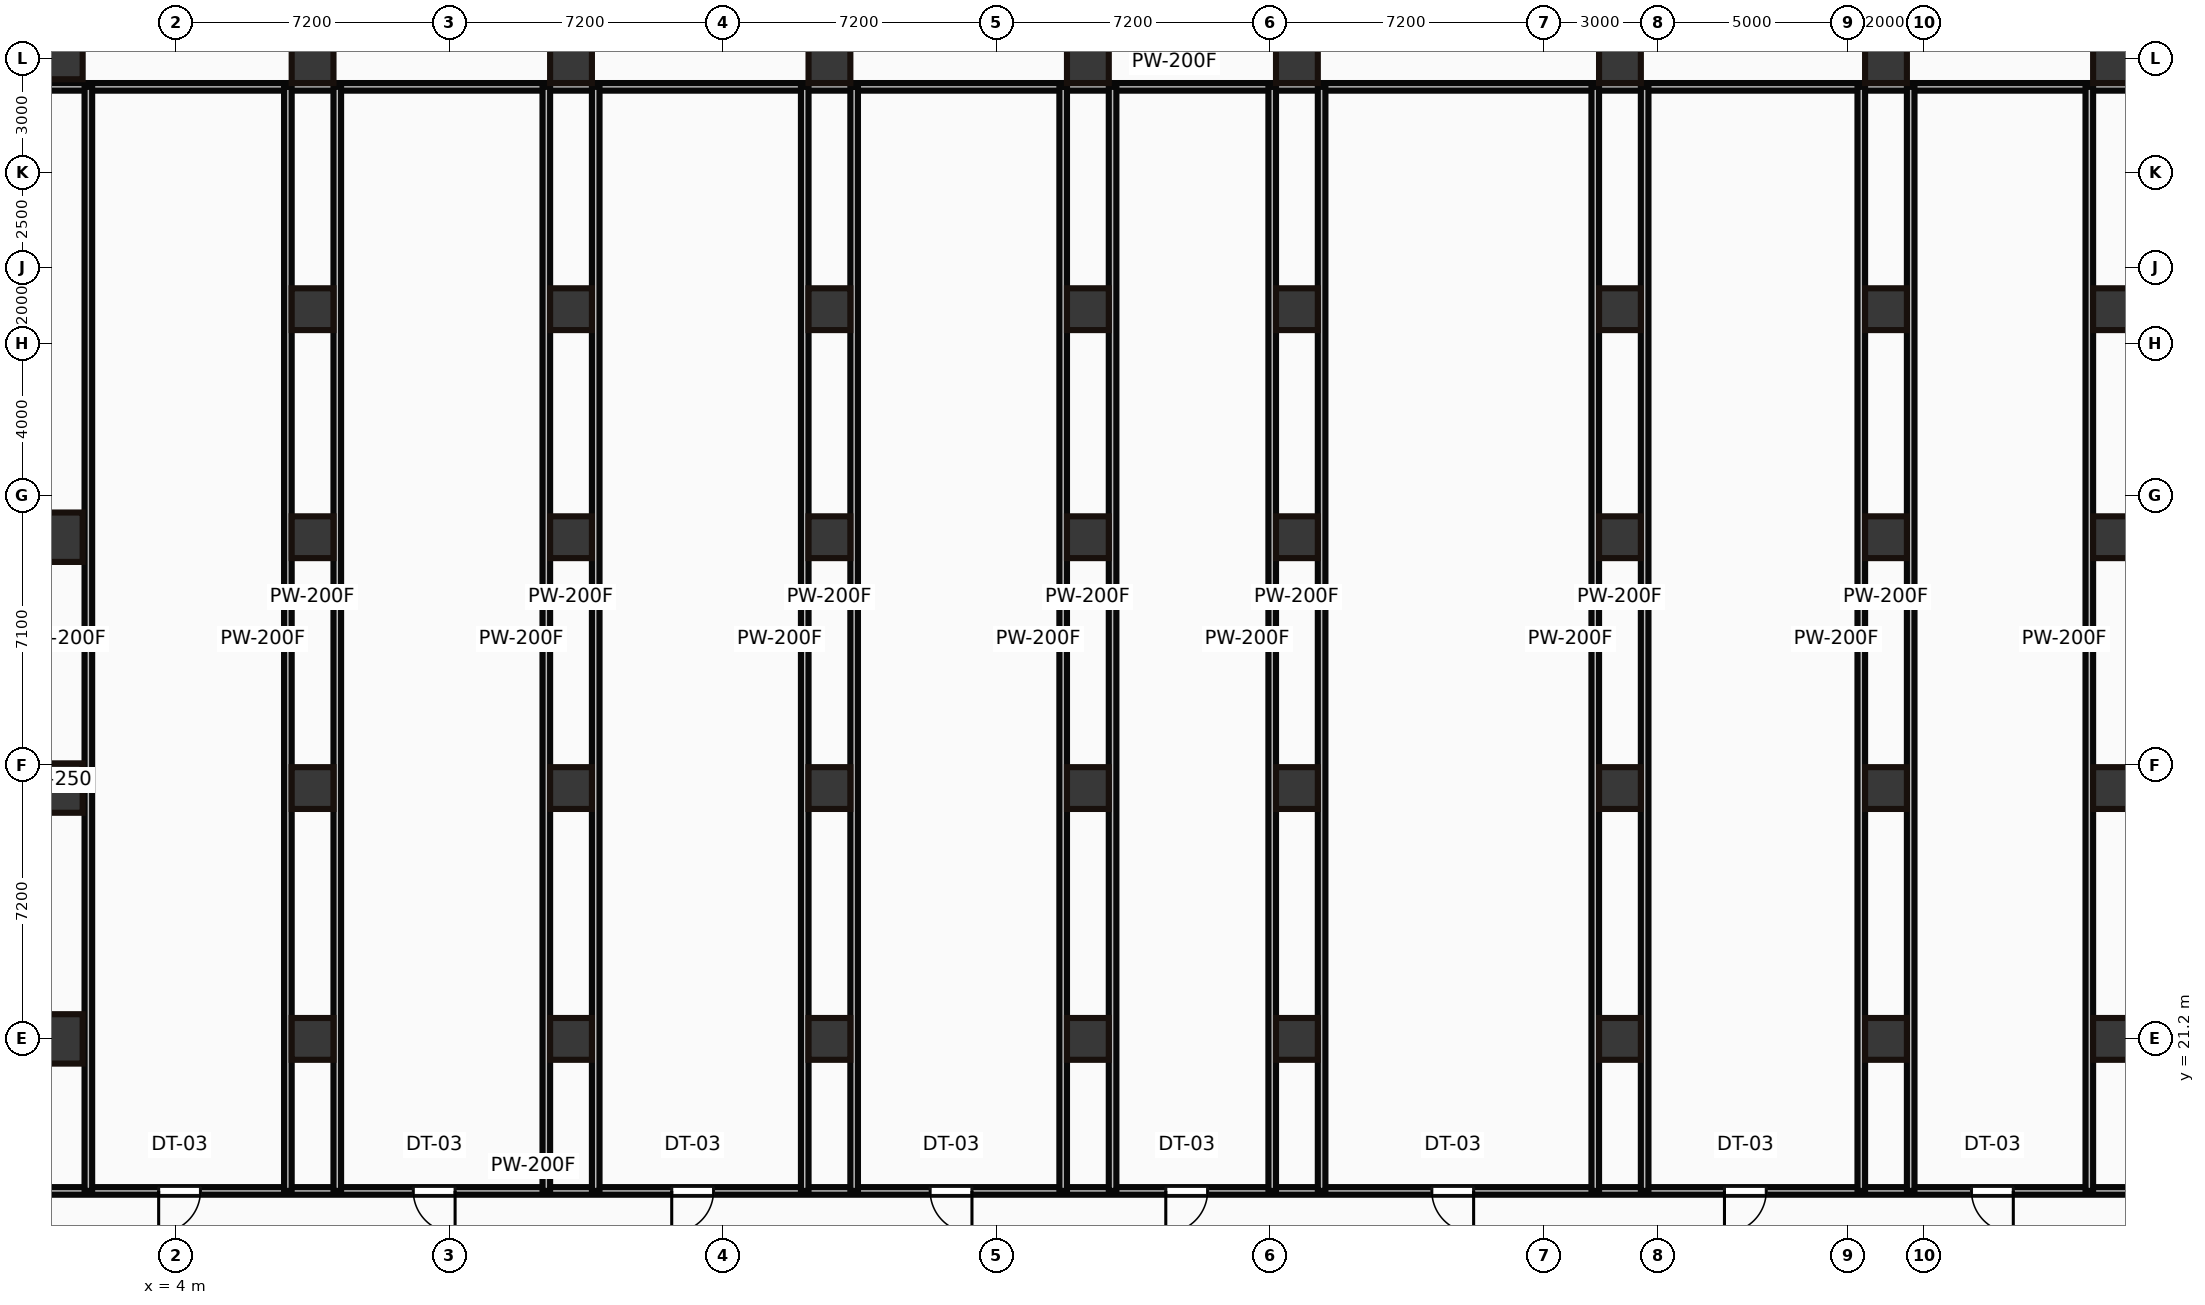
"""IFC4 building model, lengths in metres.
Left out: names, types, materials, properties, quantities, classifications, styles, units other than length and angle.
Written with IfcOpenShell. Run it as: python <this file> out.ifc"""

import sys

from ifc_helpers import new_model, si_unit, direction, frame, frame_2d, origin, origin_2d, place, context, subcontext, project, spatial, rectangle, hollow_rectangle, extrude, source, transform, mapped, element, fill, save


model = new_model("IFC4")
c1 = context("Model", 3, precision=1e-05, world=origin(), true_north=direction((0.0, 1.0)))
c2 = subcontext(c1, "Body", "Model", "MODEL_VIEW")
j1 = project(units=[si_unit("LENGTHUNIT", "METRE"), si_unit("PLANEANGLEUNIT", "RADIAN")], contexts=[c1])
p1 = place(None, origin())
s1 = spatial("IfcSite", under=j1, at=p1, CompositionType="ELEMENT")
p2 = place(p1, origin())
s2 = spatial("IfcBuilding", under=s1, at=p2, CompositionType="ELEMENT")
p3 = place(p2, frame((0.0, 0.0, 26.0)))
s3 = spatial("IfcBuildingStorey", under=s2, at=p3, CompositionType="ELEMENT", Elevation=26.0)
m1 = source(origin(), c2, "Body", "SweptSolid", [
    extrude(hollow_rectangle(XDim=1.1, YDim=1.3, WallThickness=0.055, at=origin_2d()), origin(), (0.0, 0.0, 1.0), 6.5),
])
for number, where, z_axis, x_axis in (
    (1, (1.0, 21.2, 0.0), (0.0, 0.0, 1.0), (1.0, 0.0, 0.0)),
    (2, (1.0, 27.8, 0.0), (0.0, 0.0, 1.0), (1.0, 0.0, 0.0)),
    (3, (1.0, 34.4, 0.0), (0.0, 0.0, 1.0), (1.0, 0.0, 0.0)),
):
    element("IfcColumn", number, at=place(p3, frame(where, z_axis=z_axis, x_axis=x_axis)), inside=s3, PredefinedType="PILASTER", context=c2, shape_type="MappedRepresentation", body=[
        mapped(m1, transform((0.0, 0.0, 0.0))),
    ])
m2 = source(origin(), c2, "Body", "SweptSolid", [
    extrude(hollow_rectangle(XDim=1.1, YDim=1.1, WallThickness=0.05, at=origin_2d()), origin(), (0.0, 0.0, 1.0), 6.5),
])
p4 = place(p3, frame((1.0, 47.0, 0.0), z_axis=(0.0, 0.0, 1.0), x_axis=(1.0, 0.0, 0.0)))
e4 = element("IfcColumn", 4, at=p4, inside=s3, PredefinedType="PILASTER", context=c2, shape_type="MappedRepresentation", body=[
    mapped(m2, transform((0.0, 0.0, 0.0))),
])
for number, where, z_axis, x_axis in (
    (5, (7.6, 47.0, 0.0), (0.0, 0.0, 1.0), (1.0, 0.0, 0.0)),
    (6, (14.4, 47.0, 0.0), (0.0, 0.0, 1.0), (1.0, 0.0, 0.0)),
    (7, (21.2, 47.0, 0.0), (0.0, 0.0, 1.0), (1.0, 0.0, 0.0)),
    (8, (28.0, 47.0, 0.0), (0.0, 0.0, 1.0), (1.0, 0.0, 0.0)),
    (9, (33.5, 47.0, 0.0), (0.0, 0.0, 1.0), (1.0, 0.0, 0.0)),
    (10, (42.0, 47.0, 0.0), (0.0, 0.0, 1.0), (1.0, 0.0, 0.0)),
    (11, (49.0, 47.0, 0.0), (0.0, 0.0, 1.0), (1.0, 0.0, 0.0)),
    (12, (55.0, 47.0, 0.0), (0.0, 0.0, 1.0), (1.0, 0.0, 0.0)),
):
    element("IfcColumn", number, at=place(p3, frame(where, z_axis=z_axis, x_axis=x_axis)), inside=s3, PredefinedType="PILASTER", context=c2, shape_type="MappedRepresentation", body=[
        mapped(m1, transform((0.0, 0.0, 0.0))),
    ])
m3 = source(origin(), c2, "Body", "SweptSolid", [
    extrude(hollow_rectangle(XDim=1.1, YDim=1.1, WallThickness=0.05, at=origin_2d()), origin(), (0.0, 0.0, 1.0), 5.65),
])
for number, where, z_axis, x_axis in (
    (13, (7.6, 21.2, 0.85), (0.0, 0.0, 1.0), (1.0, 0.0, 0.0)),
    (14, (7.6, 27.8, 0.85), (0.0, 0.0, 1.0), (1.0, 0.0, 0.0)),
    (15, (7.6, 34.4, 0.85), (0.0, 0.0, 1.0), (1.0, 0.0, 0.0)),
    (16, (7.6, 40.4, 0.85), (0.0, 0.0, 1.0), (1.0, 0.0, 0.0)),
    (17, (14.4, 21.2, 0.85), (0.0, 0.0, 1.0), (1.0, 0.0, 0.0)),
    (18, (14.4, 27.8, 0.85), (0.0, 0.0, 1.0), (1.0, 0.0, 0.0)),
    (19, (14.4, 34.4, 0.85), (0.0, 0.0, 1.0), (1.0, 0.0, 0.0)),
    (20, (14.4, 40.4, 0.85), (0.0, 0.0, 1.0), (1.0, 0.0, 0.0)),
    (21, (21.2, 21.2, 0.85), (0.0, 0.0, 1.0), (1.0, 0.0, 0.0)),
    (22, (21.2, 27.8, 0.85), (0.0, 0.0, 1.0), (1.0, 0.0, 0.0)),
    (23, (21.2, 34.4, 0.85), (0.0, 0.0, 1.0), (1.0, 0.0, 0.0)),
    (24, (21.2, 40.4, 0.85), (0.0, 0.0, 1.0), (1.0, 0.0, 0.0)),
    (25, (28.0, 21.2, 0.85), (0.0, 0.0, 1.0), (1.0, 0.0, 0.0)),
    (26, (28.0, 27.8, 0.85), (0.0, 0.0, 1.0), (1.0, 0.0, 0.0)),
    (27, (28.0, 34.4, 0.85), (0.0, 0.0, 1.0), (1.0, 0.0, 0.0)),
    (28, (28.0, 40.4, 0.85), (0.0, 0.0, 1.0), (1.0, 0.0, 0.0)),
    (29, (33.5, 21.2, 0.85), (0.0, 0.0, 1.0), (1.0, 0.0, 0.0)),
    (30, (33.5, 27.8, 0.85), (0.0, 0.0, 1.0), (1.0, 0.0, 0.0)),
    (31, (33.5, 34.4, 0.85), (0.0, 0.0, 1.0), (1.0, 0.0, 0.0)),
    (32, (33.5, 40.4, 0.85), (0.0, 0.0, 1.0), (1.0, 0.0, 0.0)),
    (33, (42.0, 21.2, 0.85), (0.0, 0.0, 1.0), (1.0, 0.0, 0.0)),
    (34, (42.0, 27.8, 0.85), (0.0, 0.0, 1.0), (1.0, 0.0, 0.0)),
    (35, (42.0, 34.4, 0.85), (0.0, 0.0, 1.0), (1.0, 0.0, 0.0)),
    (36, (42.0, 40.4, 0.85), (0.0, 0.0, 1.0), (1.0, 0.0, 0.0)),
    (37, (49.0, 21.2, 0.85), (0.0, 0.0, 1.0), (1.0, 0.0, 0.0)),
    (38, (49.0, 27.8, 0.85), (0.0, 0.0, 1.0), (1.0, 0.0, 0.0)),
    (39, (49.0, 34.4, 0.85), (0.0, 0.0, 1.0), (1.0, 0.0, 0.0)),
    (40, (49.0, 40.4, 0.85), (0.0, 0.0, 1.0), (1.0, 0.0, 0.0)),
    (41, (55.0, 21.2, 0.85), (0.0, 0.0, 1.0), (1.0, 0.0, 0.0)),
    (42, (55.0, 27.8, 0.85), (0.0, 0.0, 1.0), (1.0, 0.0, 0.0)),
    (43, (55.0, 34.4, 0.85), (0.0, 0.0, 1.0), (1.0, 0.0, 0.0)),
    (44, (55.0, 40.4, 0.85), (0.0, 0.0, 1.0), (1.0, 0.0, 0.0)),
):
    element("IfcColumn", number, at=place(p3, frame(where, z_axis=z_axis, x_axis=x_axis)), inside=s3, PredefinedType="PILASTER", context=c2, shape_type="MappedRepresentation", body=[
        mapped(m3, transform((0.0, 0.0, 0.0))),
    ])
m4 = source(origin(), c2, "Body", "SweptSolid", [
    extrude(rectangle(XDim=60.25, YDim=0.2, at=frame_2d((30.125, 0.0))), origin(), (0.0, 0.0, 1.0), 6.25),
])
p5 = place(p3, frame((0.15, 17.2, 0.0), z_axis=(0.0, 0.0, 1.0), x_axis=(1.0, 0.0, 0.0)))
e45 = element("IfcWall", 45, at=p5, inside=s3, PredefinedType="PARTITIONING", context=c2, shape_type="MappedRepresentation", body=[
    mapped(m4, transform((0.0, 0.0, 0.0))),
])
p6 = place(p5, frame((3.4, 0.0, 0.0)))
e46 = element("IfcOpeningElement", 46, at=p6, cuts=e45, PredefinedType="OPENING", context=c2, shape_type="SweptSolid", body=[
    extrude(rectangle(XDim=1.1, YDim=2.15, at=frame_2d((0.55, 1.075))), frame((0.0, 0.11, 0.0), z_axis=(0.0, -1.0, 0.0), x_axis=(1.0, 0.0, 0.0)), (0.0, 0.0, 1.0), 0.22),
])
p7 = place(p5, frame((10.1, 0.0, 0.0)))
e47 = element("IfcOpeningElement", 47, at=p7, cuts=e45, PredefinedType="OPENING", context=c2, shape_type="SweptSolid", body=[
    extrude(rectangle(XDim=1.1, YDim=2.15, at=frame_2d((0.55, 1.075))), frame((0.0, 0.11, 0.0), z_axis=(0.0, -1.0, 0.0), x_axis=(1.0, 0.0, 0.0)), (0.0, 0.0, 1.0), 0.22),
])
p8 = place(p5, frame((16.9, 0.0, 0.0)))
e48 = element("IfcOpeningElement", 48, at=p8, cuts=e45, PredefinedType="OPENING", context=c2, shape_type="SweptSolid", body=[
    extrude(rectangle(XDim=1.1, YDim=2.15, at=frame_2d((0.55, 1.075))), frame((0.0, 0.11, 0.0), z_axis=(0.0, -1.0, 0.0), x_axis=(1.0, 0.0, 0.0)), (0.0, 0.0, 1.0), 0.22),
])
p9 = place(p5, frame((23.7, 0.0, 0.0)))
e49 = element("IfcOpeningElement", 49, at=p9, cuts=e45, PredefinedType="OPENING", context=c2, shape_type="SweptSolid", body=[
    extrude(rectangle(XDim=1.1, YDim=2.15, at=frame_2d((0.55, 1.075))), frame((0.0, 0.11, 0.0), z_axis=(0.0, -1.0, 0.0), x_axis=(1.0, 0.0, 0.0)), (0.0, 0.0, 1.0), 0.22),
])
p10 = place(p5, frame((29.9, 0.0, 0.0)))
e50 = element("IfcOpeningElement", 50, at=p10, cuts=e45, PredefinedType="OPENING", context=c2, shape_type="SweptSolid", body=[
    extrude(rectangle(XDim=1.1, YDim=2.15, at=frame_2d((0.55, 1.075))), frame((0.0, 0.11, 0.0), z_axis=(0.0, -1.0, 0.0), x_axis=(1.0, 0.0, 0.0)), (0.0, 0.0, 1.0), 0.22),
])
p11 = place(p5, frame((36.9, 0.0, 0.0)))
e51 = element("IfcOpeningElement", 51, at=p11, cuts=e45, PredefinedType="OPENING", context=c2, shape_type="SweptSolid", body=[
    extrude(rectangle(XDim=1.1, YDim=2.15, at=frame_2d((0.55, 1.075))), frame((0.0, 0.11, 0.0), z_axis=(0.0, -1.0, 0.0), x_axis=(1.0, 0.0, 0.0)), (0.0, 0.0, 1.0), 0.22),
])
p12 = place(p5, frame((44.6, 0.0, 0.0)))
e52 = element("IfcOpeningElement", 52, at=p12, cuts=e45, PredefinedType="OPENING", context=c2, shape_type="SweptSolid", body=[
    extrude(rectangle(XDim=1.1, YDim=2.15, at=frame_2d((0.55, 1.075))), frame((0.0, 0.11, 0.0), z_axis=(0.0, -1.0, 0.0), x_axis=(1.0, 0.0, 0.0)), (0.0, 0.0, 1.0), 0.22),
])
p13 = place(p5, frame((51.1, 0.0, 0.0)))
e53 = element("IfcOpeningElement", 53, at=p13, cuts=e45, PredefinedType="OPENING", context=c2, shape_type="SweptSolid", body=[
    extrude(rectangle(XDim=1.1, YDim=2.15, at=frame_2d((0.55, 1.075))), frame((0.0, 0.11, 0.0), z_axis=(0.0, -1.0, 0.0), x_axis=(1.0, 0.0, 0.0)), (0.0, 0.0, 1.0), 0.22),
])
p14 = place(p3, frame((0.15, 46.25, 0.0), z_axis=(0.0, 0.0, 1.0), x_axis=(1.0, 0.0, 0.0)))
e54 = element("IfcWall", 54, at=p14, inside=s3, PredefinedType="PARTITIONING", context=c2, shape_type="MappedRepresentation", body=[
    mapped(m4, transform((0.0, 0.0, 0.0))),
])
m5 = source(origin(), c2, "Body", "SweptSolid", [
    extrude(rectangle(XDim=29.05, YDim=0.2, at=frame_2d((14.525, 0.0))), origin(), (0.0, 0.0, 1.0), 6.25),
])
for number, where, z_axis, x_axis in (
    (55, (1.7, 17.2, 0.0), (0.0, 0.0, 1.0), (0.0, 1.0, 0.0)),
    (56, (6.95, 17.2, 0.0), (0.0, 0.0, 1.0), (0.0, 1.0, 0.0)),
    (57, (8.25, 17.2, 0.0), (0.0, 0.0, 1.0), (0.0, 1.0, 0.0)),
    (58, (13.75, 17.2, 0.0), (0.0, 0.0, 1.0), (0.0, 1.0, 0.0)),
    (59, (15.05, 17.2, 0.0), (0.0, 0.0, 1.0), (0.0, 1.0, 0.0)),
    (60, (20.55, 17.2, 0.0), (0.0, 0.0, 1.0), (0.0, 1.0, 0.0)),
    (61, (21.85, 17.2, 0.0), (0.0, 0.0, 1.0), (0.0, 1.0, 0.0)),
    (62, (27.35, 17.2, 0.0), (0.0, 0.0, 1.0), (0.0, 1.0, 0.0)),
    (63, (28.65, 17.2, 0.0), (0.0, 0.0, 1.0), (0.0, 1.0, 0.0)),
    (64, (32.85, 17.2, 0.0), (0.0, 0.0, 1.0), (0.0, 1.0, 0.0)),
    (65, (34.15, 17.2, 0.0), (0.0, 0.0, 1.0), (0.0, 1.0, 0.0)),
    (66, (41.35, 17.2, 0.0), (0.0, 0.0, 1.0), (0.0, 1.0, 0.0)),
    (67, (42.65, 17.2, 0.0), (0.0, 0.0, 1.0), (0.0, 1.0, 0.0)),
    (68, (48.35, 17.2, 0.0), (0.0, 0.0, 1.0), (0.0, 1.0, 0.0)),
    (69, (49.65, 17.2, 0.0), (0.0, 0.0, 1.0), (0.0, 1.0, 0.0)),
    (70, (54.35, 17.2, 0.0), (0.0, 0.0, 1.0), (0.0, 1.0, 0.0)),
):
    element("IfcWall", number, at=place(p3, frame(where, z_axis=z_axis, x_axis=x_axis)), inside=s3, PredefinedType="PARTITIONING", context=c2, shape_type="MappedRepresentation", body=[
        mapped(m5, transform((0.0, 0.0, 0.0))),
    ])
m6 = source(origin(), c2, "Body", "SweptSolid", [
    extrude(rectangle(XDim=1.1, YDim=2.15, at=frame_2d((0.55, 1.075))), frame((0.0, 0.025, 0.0), z_axis=(0.0, -1.0, 0.0), x_axis=(1.0, 0.0, 0.0)), (0.0, 0.0, 1.0), 0.05),
])
p15 = place(p6, origin())
e71 = element("IfcDoor", 71, at=p15, inside=s3, OperationType="SINGLE_SWING_LEFT", PredefinedType="DOOR", context=c2, shape_type="MappedRepresentation", body=[
    mapped(m6, transform((0.0, 0.0, 0.0))),
])
fill(e46, e71)
p16 = place(p7, origin())
e72 = element("IfcDoor", 72, at=p16, inside=s3, OperationType="SINGLE_SWING_RIGHT", PredefinedType="DOOR", context=c2, shape_type="MappedRepresentation", body=[
    mapped(m6, transform((0.0, 0.0, 0.0))),
])
fill(e47, e72)
p17 = place(p8, origin())
e73 = element("IfcDoor", 73, at=p17, inside=s3, OperationType="SINGLE_SWING_LEFT", PredefinedType="DOOR", context=c2, shape_type="MappedRepresentation", body=[
    mapped(m6, transform((0.0, 0.0, 0.0))),
])
fill(e48, e73)
p18 = place(p9, origin())
e74 = element("IfcDoor", 74, at=p18, inside=s3, OperationType="SINGLE_SWING_RIGHT", PredefinedType="DOOR", context=c2, shape_type="MappedRepresentation", body=[
    mapped(m6, transform((0.0, 0.0, 0.0))),
])
fill(e49, e74)
p19 = place(p10, origin())
e75 = element("IfcDoor", 75, at=p19, inside=s3, OperationType="SINGLE_SWING_LEFT", PredefinedType="DOOR", context=c2, shape_type="MappedRepresentation", body=[
    mapped(m6, transform((0.0, 0.0, 0.0))),
])
fill(e50, e75)
p20 = place(p11, origin())
e76 = element("IfcDoor", 76, at=p20, inside=s3, OperationType="SINGLE_SWING_RIGHT", PredefinedType="DOOR", context=c2, shape_type="MappedRepresentation", body=[
    mapped(m6, transform((0.0, 0.0, 0.0))),
])
fill(e51, e76)
p21 = place(p12, origin())
e77 = element("IfcDoor", 77, at=p21, inside=s3, OperationType="SINGLE_SWING_LEFT", PredefinedType="DOOR", context=c2, shape_type="MappedRepresentation", body=[
    mapped(m6, transform((0.0, 0.0, 0.0))),
])
fill(e52, e77)
p22 = place(p13, origin())
e78 = element("IfcDoor", 78, at=p22, inside=s3, OperationType="SINGLE_SWING_RIGHT", PredefinedType="DOOR", context=c2, shape_type="MappedRepresentation", body=[
    mapped(m6, transform((0.0, 0.0, 0.0))),
])
fill(e53, e78)
save(model, sys.argv[1])
